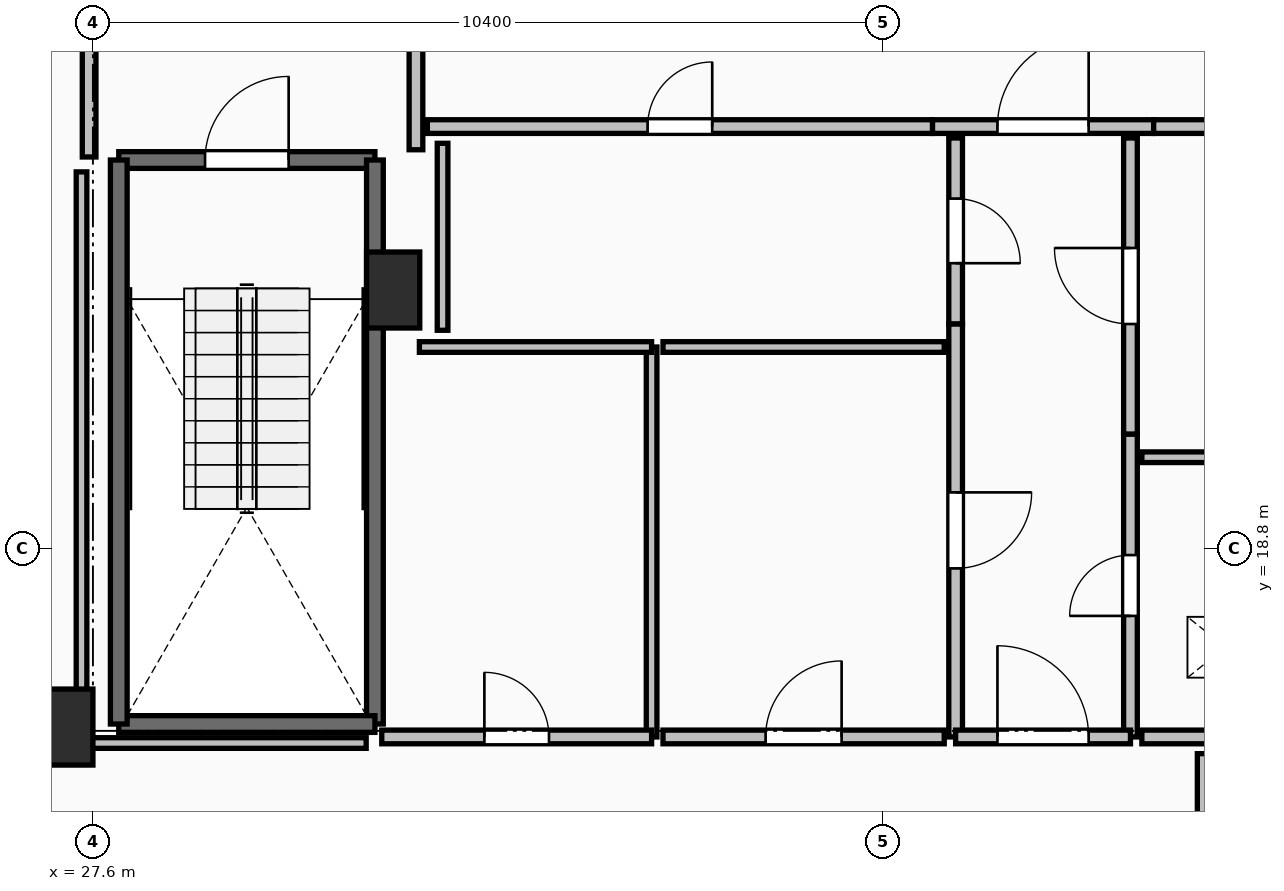
"""IFC4 building model, lengths in metres.
Left out: names, types, materials, properties, quantities, classifications, styles, units other than length and angle.
Written with IfcOpenShell. Run it as: python <this file> out.ifc"""

import sys

from ifc_helpers import new_model, si_unit, direction, frame, frame_2d, origin, origin_2d, place, context, subcontext, project, spatial, rectangle, extrude, element, fill, save


model = new_model("IFC4")
c1 = context("Model", 3, precision=1e-05, world=origin(), true_north=direction((0.0, 1.0)))
c2 = subcontext(c1, "Body", "Model", "MODEL_VIEW")
j1 = project(units=[si_unit("LENGTHUNIT", "METRE"), si_unit("PLANEANGLEUNIT", "RADIAN")], contexts=[c1])
p1 = place(None, origin())
s1 = spatial("IfcSite", under=j1, at=p1, CompositionType="ELEMENT")
p2 = place(p1, origin())
s2 = spatial("IfcBuilding", under=s1, at=p2, CompositionType="ELEMENT")
p3 = place(p2, frame((0.0, 0.0, 273.3)))
s3 = spatial("IfcBuildingStorey", under=s2, at=p3, CompositionType="ELEMENT", Elevation=273.3)
for number, where, z_axis, x_axis in (
    (1, (27.25, 16.45, 0.0), (0.0, 0.0, 1.0), (1.0, 0.0, 0.0)),
    (2, (31.55, 22.2, 0.0), (0.0, 0.0, 1.0), (1.0, 0.0, 0.0)),
):
    element("IfcColumn", number, at=place(p3, frame(where, z_axis=z_axis, x_axis=x_axis)), inside=s3, PredefinedType="PILASTER", context=c2, shape_type="SweptSolid", body=[
        extrude(rectangle(XDim=0.7, YDim=1.0, at=origin_2d()), origin(), (0.0, 0.0, 1.0), 3.55),
    ])
p4 = place(p3, frame((27.94, 23.91, 0.0), z_axis=(0.0, 0.0, 1.0), x_axis=(1.0, 0.0, 0.0)))
e3 = element("IfcWall", 3, at=p4, inside=s3, PredefinedType="SOLIDWALL", context=c2, shape_type="SweptSolid", body=[
    extrude(rectangle(XDim=3.37, YDim=0.22, at=frame_2d((1.685, 0.0))), origin(), (0.0, 0.0, 1.0), 3.29),
])
p5 = place(p4, frame((1.135, 0.0, 0.0)))
e4 = element("IfcOpeningElement", 4, at=p5, cuts=e3, PredefinedType="OPENING", context=c2, shape_type="SweptSolid", body=[
    extrude(rectangle(XDim=1.1, YDim=2.15, at=frame_2d((0.55, 1.075))), frame((0.0, 0.125, 0.0), z_axis=(0.0, -1.0, 0.0), x_axis=(1.0, 0.0, 0.0)), (0.0, 0.0, 1.0), 0.25),
])
p6 = place(p3, frame((31.31, 23.91, 0.0), z_axis=(0.0, 0.0, 1.0), x_axis=(0.0, -1.0, 0.0)))
e5 = element("IfcWall", 5, at=p6, inside=s3, PredefinedType="SOLIDWALL", context=c2, shape_type="SweptSolid", body=[
    extrude(rectangle(XDim=7.42, YDim=0.22, at=frame_2d((3.71, 0.0))), origin(), (0.0, 0.0, 1.0), 3.29),
])
p7 = place(p3, frame((31.31, 16.49, 0.0), z_axis=(0.0, 0.0, 1.0), x_axis=(-1.0, 0.0, 0.0)))
e6 = element("IfcWall", 6, at=p7, inside=s3, PredefinedType="SOLIDWALL", context=c2, shape_type="SweptSolid", body=[
    extrude(rectangle(XDim=3.37, YDim=0.22, at=frame_2d((1.685, 0.0))), origin(), (0.0, 0.0, 1.0), 3.29),
])
p8 = place(p3, frame((27.94, 16.49, 0.0), z_axis=(0.0, 0.0, 1.0), x_axis=(0.0, 1.0, 0.0)))
e7 = element("IfcWall", 7, at=p8, inside=s3, PredefinedType="SOLIDWALL", context=c2, shape_type="SweptSolid", body=[
    extrude(rectangle(XDim=7.42, YDim=0.22, at=frame_2d((3.71, 0.0))), origin(), (0.0, 0.0, 1.0), 3.29),
])
p9 = place(p3, frame((31.85, 24.045, 0.0), z_axis=(0.0, 0.0, 1.0), x_axis=(0.0, 1.0, 0.0)))
e8 = element("IfcWall", 8, at=p9, inside=s3, PredefinedType="PARTITIONING", context=c2, shape_type="SweptSolid", body=[
    extrude(rectangle(XDim=3.91, YDim=0.18, at=frame_2d((1.955, 0.0))), origin(), (0.0, 0.0, 1.0), 3.29),
])
p10 = place(p9, frame((1.355, 0.0, 0.0)))
e9 = element("IfcOpeningElement", 9, at=p10, cuts=e8, PredefinedType="OPENING", context=c2, shape_type="SweptSolid", body=[
    extrude(rectangle(XDim=1.2, YDim=2.15, at=frame_2d((0.6, 1.075))), frame((0.0, 0.105, 0.0), z_axis=(0.0, -1.0, 0.0), x_axis=(1.0, 0.0, 0.0)), (0.0, 0.0, 1.0), 0.21),
])
p11 = place(p3, frame((27.55, 28.0, 0.0), z_axis=(0.0, 0.0, 1.0), x_axis=(0.0, -1.0, 0.0)))
e10 = element("IfcWall", 10, at=p11, inside=s3, PredefinedType="PARTITIONING", context=c2, shape_type="SweptSolid", body=[
    extrude(rectangle(XDim=4.05, YDim=0.18, at=frame_2d((2.025, 0.0))), origin(), (0.0, 0.0, 1.0), 3.29),
])
p12 = place(p11, frame((1.425, 0.0, 0.0)))
e11 = element("IfcOpeningElement", 11, at=p12, cuts=e10, PredefinedType="OPENING", context=c2, shape_type="SweptSolid", body=[
    extrude(rectangle(XDim=1.2, YDim=2.15, at=frame_2d((0.6, 1.075))), frame((0.0, 0.105, 0.0), z_axis=(0.0, -1.0, 0.0), x_axis=(1.0, 0.0, 0.0)), (0.0, 0.0, 1.0), 0.21),
])
p13 = place(p3, frame((38.645, 24.35, 0.0), z_axis=(0.0, 0.0, 1.0), x_axis=(1.0, 0.0, 0.0)))
e12 = element("IfcWall", 12, at=p13, inside=s3, PredefinedType="PARTITIONING", context=c2, shape_type="SweptSolid", body=[
    extrude(rectangle(XDim=2.91, YDim=0.18, at=frame_2d((1.455, 0.0))), origin(), (0.0, 0.0, 1.0), 3.29),
])
p14 = place(p13, frame((0.855, 0.0, 0.0)))
e13 = element("IfcOpeningElement", 13, at=p14, cuts=e12, PredefinedType="OPENING", context=c2, shape_type="SweptSolid", body=[
    extrude(rectangle(XDim=1.2, YDim=2.15, at=frame_2d((0.6, 1.075))), frame((0.0, 0.105, 0.0), z_axis=(0.0, -1.0, 0.0), x_axis=(1.0, 0.0, 0.0)), (0.0, 0.0, 1.0), 0.21),
])
p15 = place(p3, frame((41.555, 24.35, 0.0), z_axis=(0.0, 0.0, 1.0), x_axis=(1.0, 0.0, 0.0)))
e14 = element("IfcWall", 14, at=p15, inside=s3, PredefinedType="PARTITIONING", context=c2, shape_type="SweptSolid", body=[
    extrude(rectangle(XDim=2.445, YDim=0.18, at=frame_2d((1.223, 0.0))), origin(), (0.0, 0.0, 1.0), 3.29),
])
p16 = place(p15, frame((0.722, 0.0, 0.0)))
e15 = element("IfcOpeningElement", 15, at=p16, cuts=e14, PredefinedType="OPENING", context=c2, shape_type="SweptSolid", body=[
    extrude(rectangle(XDim=1.0, YDim=2.15, at=frame_2d((0.5, 1.075))), frame((0.0, 0.105, 0.0), z_axis=(0.0, -1.0, 0.0), x_axis=(1.0, 0.0, 0.0)), (0.0, 0.0, 1.0), 0.21),
])
p17 = place(p3, frame((32.0, 24.35, 0.0), z_axis=(0.0, 0.0, 1.0), x_axis=(1.0, 0.0, 0.0)))
e16 = element("IfcWall", 16, at=p17, inside=s3, PredefinedType="PARTITIONING", context=c2, shape_type="SweptSolid", body=[
    extrude(rectangle(XDim=6.645, YDim=0.18, at=frame_2d((3.323, 0.0))), origin(), (0.0, 0.0, 1.0), 3.29),
])
p18 = place(p17, frame((2.897, 0.0, 0.0)))
e17 = element("IfcOpeningElement", 17, at=p18, cuts=e16, PredefinedType="OPENING", context=c2, shape_type="SweptSolid", body=[
    extrude(rectangle(XDim=0.85, YDim=2.1, at=frame_2d((0.425, 1.05))), frame((0.0, 0.105, 0.0), z_axis=(0.0, -1.0, 0.0), x_axis=(1.0, 0.0, 0.0)), (0.0, 0.0, 1.0), 0.21),
])
p19 = place(p3, frame((41.25, 16.32, 0.0), z_axis=(0.0, 0.0, 1.0), x_axis=(0.0, 1.0, 0.0)))
e18 = element("IfcWall", 18, at=p19, inside=s3, PredefinedType="PARTITIONING", context=c2, shape_type="SweptSolid", body=[
    extrude(rectangle(XDim=3.985, YDim=0.18, at=frame_2d((1.992, 0.0))), origin(), (0.0, 0.0, 1.0), 3.29),
])
p20 = place(p19, frame((1.593, 0.0, 0.0)))
e19 = element("IfcOpeningElement", 19, at=p20, cuts=e18, PredefinedType="OPENING", context=c2, shape_type="SweptSolid", body=[
    extrude(rectangle(XDim=0.8, YDim=2.05, at=frame_2d((0.4, 1.025))), frame((0.0, 0.105, 0.0), z_axis=(0.0, -1.0, 0.0), x_axis=(1.0, 0.0, 0.0)), (0.0, 0.0, 1.0), 0.21),
])
p21 = place(p3, frame((41.25, 20.305, 0.0), z_axis=(0.0, 0.0, 1.0), x_axis=(0.0, 1.0, 0.0)))
e20 = element("IfcWall", 20, at=p21, inside=s3, PredefinedType="PARTITIONING", context=c2, shape_type="SweptSolid", body=[
    extrude(rectangle(XDim=3.895, YDim=0.18, at=frame_2d((1.948, 0.0))), origin(), (0.0, 0.0, 1.0), 2.482),
])
p22 = place(p21, frame((1.448, 0.0, 0.0)))
e21 = element("IfcOpeningElement", 21, at=p22, cuts=e20, PredefinedType="OPENING", context=c2, shape_type="SweptSolid", body=[
    extrude(rectangle(XDim=1.0, YDim=2.15, at=frame_2d((0.5, 1.075))), frame((0.0, 0.105, 0.0), z_axis=(0.0, -1.0, 0.0), x_axis=(1.0, 0.0, 0.0)), (0.0, 0.0, 1.0), 0.21),
])
p23 = place(p3, frame((38.95, 21.755, 0.0), z_axis=(0.0, 0.0, 1.0), x_axis=(0.0, -1.0, 0.0)))
e22 = element("IfcWall", 22, at=p23, inside=s3, PredefinedType="PARTITIONING", context=c2, shape_type="SweptSolid", body=[
    extrude(rectangle(XDim=5.435, YDim=0.18, at=frame_2d((2.717, 0.0))), origin(), (0.0, 0.0, 1.0), 3.29),
])
p24 = place(p23, frame((2.218, 0.0, 0.0)))
e23 = element("IfcOpeningElement", 23, at=p24, cuts=e22, PredefinedType="OPENING", context=c2, shape_type="SweptSolid", body=[
    extrude(rectangle(XDim=1.0, YDim=2.15, at=frame_2d((0.5, 1.075))), frame((0.0, 0.105, 0.0), z_axis=(0.0, -1.0, 0.0), x_axis=(1.0, 0.0, 0.0)), (0.0, 0.0, 1.0), 0.21),
])
p25 = place(p3, frame((38.95, 24.2, 0.0), z_axis=(0.0, 0.0, 1.0), x_axis=(0.0, -1.0, 0.0)))
e24 = element("IfcWall", 24, at=p25, inside=s3, PredefinedType="PARTITIONING", context=c2, shape_type="SweptSolid", body=[
    extrude(rectangle(XDim=2.445, YDim=0.18, at=frame_2d((1.223, 0.0))), origin(), (0.0, 0.0, 1.0), 2.482),
])
p26 = place(p25, frame((0.798, 0.0, 0.0)))
e25 = element("IfcOpeningElement", 25, at=p26, cuts=e24, PredefinedType="OPENING", context=c2, shape_type="SweptSolid", body=[
    extrude(rectangle(XDim=0.85, YDim=2.1, at=frame_2d((0.425, 1.05))), frame((0.0, 0.105, 0.0), z_axis=(0.0, -1.0, 0.0), x_axis=(1.0, 0.0, 0.0)), (0.0, 0.0, 1.0), 0.21),
])
p27 = place(p3, frame((38.95, 16.32, 0.0), z_axis=(0.0, 0.0, 1.0), x_axis=(1.0, 0.0, 0.0)))
e26 = element("IfcWall", 26, at=p27, inside=s3, PredefinedType="PARTITIONING", context=c2, shape_type="SweptSolid", body=[
    extrude(rectangle(XDim=2.3, YDim=0.18, at=frame_2d((1.15, 0.0))), origin(), (0.0, 0.0, 1.0), 3.29),
])
p28 = place(p27, frame((0.55, 0.0, 0.0)))
e27 = element("IfcOpeningElement", 27, at=p28, cuts=e26, PredefinedType="OPENING", context=c2, shape_type="SweptSolid", body=[
    extrude(rectangle(XDim=1.2, YDim=2.15, at=frame_2d((0.6, 1.075))), frame((0.0, 0.105, 0.0), z_axis=(0.0, -1.0, 0.0), x_axis=(1.0, 0.0, 0.0)), (0.0, 0.0, 1.0), 0.21),
])
p29 = place(p3, frame((44.6, 20.0, 0.0), z_axis=(0.0, 0.0, 1.0), x_axis=(-1.0, 0.0, 0.0)))
e28 = element("IfcWall", 28, at=p29, inside=s3, PredefinedType="PARTITIONING", context=c2, shape_type="SweptSolid", body=[
    extrude(rectangle(XDim=3.2, YDim=0.14, at=frame_2d((1.6, 0.0))), origin(), (0.0, 0.0, 1.0), 3.29),
])
p30 = place(p3, frame((41.4, 16.32, 0.0), z_axis=(0.0, 0.0, 1.0), x_axis=(1.0, 0.0, 0.0)))
e29 = element("IfcWall", 29, at=p30, inside=s3, PredefinedType="PARTITIONING", context=c2, shape_type="SweptSolid", body=[
    extrude(rectangle(XDim=3.2, YDim=0.18, at=frame_2d((1.6, 0.0))), origin(), (0.0, 0.0, 1.0), 3.29),
])
p31 = place(p30, frame((1.2, 0.0, 0.0)))
e30 = element("IfcOpeningElement", 30, at=p31, cuts=e29, PredefinedType="OPENING", context=c2, shape_type="SweptSolid", body=[
    extrude(rectangle(XDim=0.8, YDim=2.05, at=frame_2d((0.4, 1.025))), frame((0.0, 0.105, 0.0), z_axis=(0.0, -1.0, 0.0), x_axis=(1.0, 0.0, 0.0)), (0.0, 0.0, 1.0), 0.21),
])
p32 = place(p3, frame((34.95, 16.32, 0.0), z_axis=(0.0, 0.0, 1.0), x_axis=(0.0, 1.0, 0.0)))
e31 = element("IfcWall", 31, at=p32, inside=s3, PredefinedType="PARTITIONING", context=c2, shape_type="SweptSolid", body=[
    extrude(rectangle(XDim=5.13, YDim=0.14, at=frame_2d((2.565, 0.0))), origin(), (0.0, 0.0, 1.0), 3.29),
])
p33 = place(p3, frame((34.95, 21.45, 0.0), z_axis=(0.0, 0.0, 1.0), x_axis=(-1.0, 0.0, 0.0)))
e32 = element("IfcWall", 32, at=p33, inside=s3, PredefinedType="PARTITIONING", context=c2, shape_type="SweptSolid", body=[
    extrude(rectangle(XDim=3.055, YDim=0.14, at=frame_2d((1.527, 0.0))), origin(), (0.0, 0.0, 1.0), 3.29),
])
p34 = place(p3, frame((31.4, 16.32, 0.0), z_axis=(0.0, 0.0, 1.0), x_axis=(1.0, 0.0, 0.0)))
e33 = element("IfcWall", 33, at=p34, inside=s3, PredefinedType="PARTITIONING", context=c2, shape_type="SweptSolid", body=[
    extrude(rectangle(XDim=3.55, YDim=0.18, at=frame_2d((1.775, 0.0))), origin(), (0.0, 0.0, 1.0), 3.29),
])
p35 = place(p34, frame((1.35, 0.0, 0.0)))
e34 = element("IfcOpeningElement", 34, at=p35, cuts=e33, PredefinedType="OPENING", context=c2, shape_type="SweptSolid", body=[
    extrude(rectangle(XDim=0.85, YDim=2.1, at=frame_2d((0.425, 1.05))), frame((0.0, 0.105, 0.0), z_axis=(0.0, -1.0, 0.0), x_axis=(1.0, 0.0, 0.0)), (0.0, 0.0, 1.0), 0.21),
])
p36 = place(p3, frame((38.8, 21.45, 0.0), z_axis=(0.0, 0.0, 1.0), x_axis=(-1.0, 0.0, 0.0)))
e35 = element("IfcWall", 35, at=p36, inside=s3, PredefinedType="PARTITIONING", context=c2, shape_type="SweptSolid", body=[
    extrude(rectangle(XDim=3.7, YDim=0.14, at=frame_2d((1.85, 0.0))), origin(), (0.0, 0.0, 1.0), 3.29),
])
p37 = place(p3, frame((35.1, 16.32, 0.0), z_axis=(0.0, 0.0, 1.0), x_axis=(1.0, 0.0, 0.0)))
e36 = element("IfcWall", 36, at=p37, inside=s3, PredefinedType="PARTITIONING", context=c2, shape_type="SweptSolid", body=[
    extrude(rectangle(XDim=3.7, YDim=0.18, at=frame_2d((1.85, 0.0))), origin(), (0.0, 0.0, 1.0), 3.29),
])
p38 = place(p37, frame((1.35, 0.0, 0.0)))
e37 = element("IfcOpeningElement", 37, at=p38, cuts=e36, PredefinedType="OPENING", context=c2, shape_type="SweptSolid", body=[
    extrude(rectangle(XDim=1.0, YDim=2.15, at=frame_2d((0.5, 1.075))), frame((0.0, 0.105, 0.0), z_axis=(0.0, -1.0, 0.0), x_axis=(1.0, 0.0, 0.0)), (0.0, 0.0, 1.0), 0.21),
])
p39 = place(p3, frame((32.2, 24.13, 0.0), z_axis=(0.0, 0.0, 1.0), x_axis=(0.0, -1.0, 0.0)))
e38 = element("IfcWall", 38, at=p39, inside=s3, PredefinedType="PARTITIONING", context=c2, shape_type="SweptSolid", body=[
    extrude(rectangle(XDim=2.46, YDim=0.14, at=frame_2d((1.23, 0.0))), origin(), (0.0, 0.0, 1.0), 2.482),
])
p40 = place(p3, frame((27.45, 23.754, 0.0), z_axis=(0.0, 0.0, 1.0), x_axis=(0.0, -1.0, 0.0)))
e39 = element("IfcWall", 39, at=p40, inside=s3, PredefinedType="PARTITIONING", context=c2, shape_type="SweptSolid", body=[
    extrude(rectangle(XDim=7.514, YDim=0.14, at=frame_2d((3.757, 0.0))), origin(), (0.0, 0.0, 1.0), 2.482),
])
p41 = place(p3, frame((27.45, 16.24, 0.0), z_axis=(0.0, 0.0, 1.0), x_axis=(1.0, 0.0, 0.0)))
e40 = element("IfcWall", 40, at=p41, inside=s3, PredefinedType="PARTITIONING", context=c2, shape_type="SweptSolid", body=[
    extrude(rectangle(XDim=3.745, YDim=0.14, at=frame_2d((1.873, 0.0))), origin(), (0.0, 0.0, 1.0), 2.482),
])
p42 = place(p3, frame((42.2, 16.1, 0.0), z_axis=(0.0, 0.0, 1.0), x_axis=(0.0, -1.0, 0.0)))
e41 = element("IfcWall", 41, at=p42, inside=s3, PredefinedType="PARTITIONING", context=c2, shape_type="SweptSolid", body=[
    extrude(rectangle(XDim=1.85, YDim=0.14, at=frame_2d((0.925, 0.0))), origin(), (0.0, 0.0, 1.0), 2.924),
])
p43 = place(p5, origin())
e42 = element("IfcDoor", 42, at=p43, inside=s3, OperationType="SINGLE_SWING_RIGHT", PredefinedType="DOOR", context=c2, shape_type="SweptSolid", body=[
    extrude(rectangle(XDim=1.1, YDim=2.15, at=frame_2d((0.55, 1.075))), frame((0.0, 0.025, 0.0), z_axis=(0.0, -1.0, 0.0), x_axis=(1.0, 0.0, 0.0)), (0.0, 0.0, 1.0), 0.05),
])
fill(e4, e42)
p44 = place(p14, origin())
e43 = element("IfcDoor", 43, at=p44, inside=s3, OperationType="SINGLE_SWING_RIGHT", PredefinedType="DOOR", context=c2, shape_type="SweptSolid", body=[
    extrude(rectangle(XDim=1.2, YDim=2.15, at=frame_2d((0.6, 1.075))), frame((0.0, 0.025, 0.0), z_axis=(0.0, -1.0, 0.0), x_axis=(1.0, 0.0, 0.0)), (0.0, 0.0, 1.0), 0.05),
])
fill(e13, e43)
p45 = place(p18, origin())
e44 = element("IfcDoor", 44, at=p45, inside=s3, OperationType="SINGLE_SWING_RIGHT", PredefinedType="DOOR", context=c2, shape_type="SweptSolid", body=[
    extrude(rectangle(XDim=0.85, YDim=2.1, at=frame_2d((0.425, 1.05))), frame((0.0, 0.025, 0.0), z_axis=(0.0, -1.0, 0.0), x_axis=(1.0, 0.0, 0.0)), (0.0, 0.0, 1.0), 0.05),
])
fill(e17, e44)
p46 = place(p20, origin())
e45 = element("IfcDoor", 45, at=p46, inside=s3, OperationType="SINGLE_SWING_LEFT", PredefinedType="DOOR", context=c2, shape_type="SweptSolid", body=[
    extrude(rectangle(XDim=0.8, YDim=2.05, at=frame_2d((0.4, 1.025))), frame((0.0, 0.025, 0.0), z_axis=(0.0, -1.0, 0.0), x_axis=(1.0, 0.0, 0.0)), (0.0, 0.0, 1.0), 0.05),
])
fill(e19, e45)
p47 = place(p22, origin())
e46 = element("IfcDoor", 46, at=p47, inside=s3, OperationType="SINGLE_SWING_RIGHT", PredefinedType="DOOR", context=c2, shape_type="SweptSolid", body=[
    extrude(rectangle(XDim=1.0, YDim=2.15, at=frame_2d((0.5, 1.075))), frame((0.0, 0.025, 0.0), z_axis=(0.0, -1.0, 0.0), x_axis=(1.0, 0.0, 0.0)), (0.0, 0.0, 1.0), 0.05),
])
fill(e21, e46)
p48 = place(p24, origin())
e47 = element("IfcDoor", 47, at=p48, inside=s3, OperationType="SINGLE_SWING_LEFT", PredefinedType="DOOR", context=c2, shape_type="SweptSolid", body=[
    extrude(rectangle(XDim=1.0, YDim=2.15, at=frame_2d((0.5, 1.075))), frame((0.0, 0.025, 0.0), z_axis=(0.0, -1.0, 0.0), x_axis=(1.0, 0.0, 0.0)), (0.0, 0.0, 1.0), 0.05),
])
fill(e23, e47)
p49 = place(p26, origin())
e48 = element("IfcDoor", 48, at=p49, inside=s3, OperationType="SINGLE_SWING_RIGHT", PredefinedType="DOOR", context=c2, shape_type="SweptSolid", body=[
    extrude(rectangle(XDim=0.85, YDim=2.1, at=frame_2d((0.425, 1.05))), frame((0.0, 0.025, 0.0), z_axis=(0.0, -1.0, 0.0), x_axis=(1.0, 0.0, 0.0)), (0.0, 0.0, 1.0), 0.05),
])
fill(e25, e48)
p50 = place(p28, origin())
e49 = element("IfcDoor", 49, at=p50, inside=s3, OperationType="SINGLE_SWING_LEFT", PredefinedType="DOOR", context=c2, shape_type="SweptSolid", body=[
    extrude(rectangle(XDim=1.2, YDim=2.15, at=frame_2d((0.6, 1.075))), frame((0.0, 0.025, 0.0), z_axis=(0.0, -1.0, 0.0), x_axis=(1.0, 0.0, 0.0)), (0.0, 0.0, 1.0), 0.05),
])
fill(e27, e49)
p51 = place(p35, origin())
e50 = element("IfcDoor", 50, at=p51, inside=s3, OperationType="SINGLE_SWING_LEFT", PredefinedType="DOOR", context=c2, shape_type="SweptSolid", body=[
    extrude(rectangle(XDim=0.85, YDim=2.1, at=frame_2d((0.425, 1.05))), frame((0.0, 0.025, 0.0), z_axis=(0.0, -1.0, 0.0), x_axis=(1.0, 0.0, 0.0)), (0.0, 0.0, 1.0), 0.05),
])
fill(e34, e50)
p52 = place(p38, origin())
e51 = element("IfcDoor", 51, at=p52, inside=s3, OperationType="SINGLE_SWING_RIGHT", PredefinedType="DOOR", context=c2, shape_type="SweptSolid", body=[
    extrude(rectangle(XDim=1.0, YDim=2.15, at=frame_2d((0.5, 1.075))), frame((0.0, 0.025, 0.0), z_axis=(0.0, -1.0, 0.0), x_axis=(1.0, 0.0, 0.0)), (0.0, 0.0, 1.0), 0.05),
])
fill(e37, e51)
save(model, sys.argv[1])
